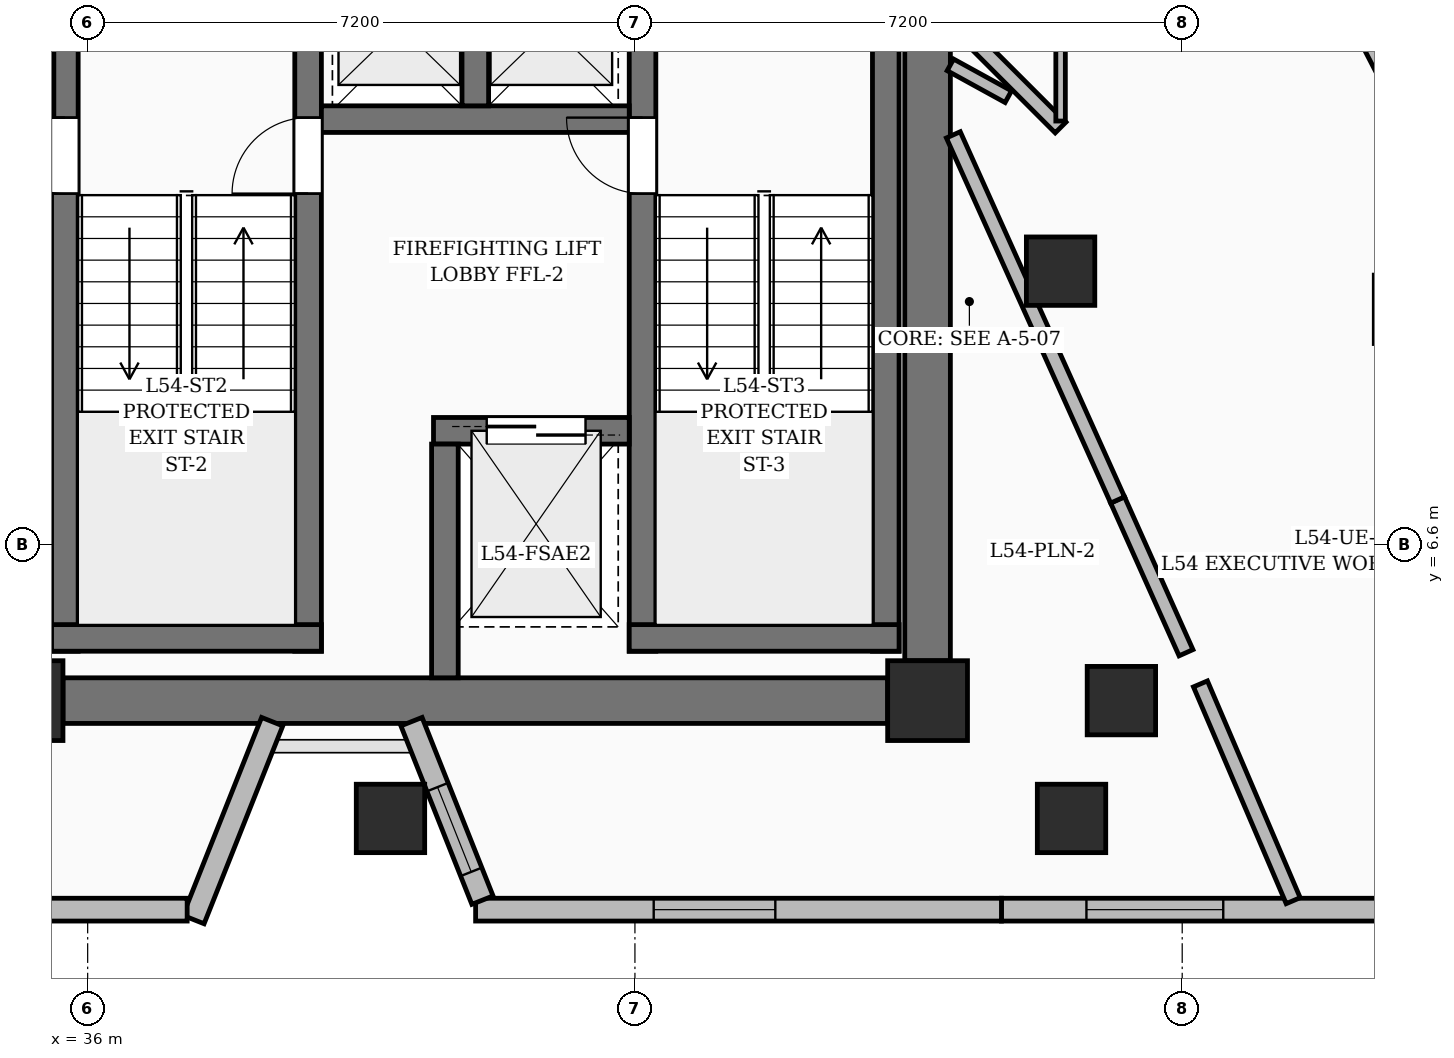
"""IFC4 building model, lengths in metres.
Left out: names, types, materials, properties, quantities, classifications, styles, units other than length and angle.
Written with IfcOpenShell. Run it as: python <this file> out.ifc"""

import sys

from ifc_helpers import new_model, si_unit, direction, frame, frame_2d, origin, origin_2d, place, context, subcontext, project, spatial, rectangle, extrude, element, fill, save


model = new_model("IFC4")
c1 = context("Model", 3, precision=1e-05, world=origin(), true_north=direction((0.0, 1.0)))
c2 = subcontext(c1, "Body", "Model", "MODEL_VIEW")
j1 = project(units=[si_unit("LENGTHUNIT", "METRE"), si_unit("PLANEANGLEUNIT", "RADIAN")], contexts=[c1])
p1 = place(None, origin())
s1 = spatial("IfcSite", under=j1, at=p1, CompositionType="ELEMENT")
p2 = place(p1, origin())
s2 = spatial("IfcBuilding", under=s1, at=p2, CompositionType="ELEMENT")
p3 = place(p2, frame((0.0, 0.0, 210.75)))
s3 = spatial("IfcBuildingStorey", under=s2, at=p3, CompositionType="ELEMENT", Elevation=210.75)
for number, where, z_axis, x_axis in (
    (1, (35.15, 4.55, 0.0), (0.0, 0.0, 1.0), (1.0, 0.0, 0.0)),
    (2, (47.05, 4.55, 0.0), (0.0, 0.0, 1.0), (1.0, 0.0, 0.0)),
):
    element("IfcColumn", number, at=place(p3, frame(where, z_axis=z_axis, x_axis=x_axis)), inside=s3, PredefinedType="COLUMN", context=c2, shape_type="SweptSolid", body=[
        extrude(rectangle(XDim=1.05, YDim=1.05, at=origin_2d()), origin(), (0.0, 0.0, 1.0), 3.75),
    ])
for number, where, z_axis, x_axis in (
    (3, (49.6, 4.55, 0.0), (0.0, 0.0, 1.0), (1.0, 0.0, 0.0)),
    (4, (48.8, 10.2, 0.0), (0.0, 0.0, 1.0), (1.0, 0.0, 0.0)),
):
    element("IfcColumn", number, at=place(p3, frame(where, z_axis=z_axis, x_axis=x_axis)), inside=s3, PredefinedType="COLUMN", context=c2, shape_type="SweptSolid", body=[
        extrude(rectangle(XDim=0.9, YDim=0.9, at=origin_2d()), origin(), (0.0, 0.0, 1.0), 3.75),
    ])
p4 = place(p3, frame((35.675, 4.55, 0.0), z_axis=(0.0, 0.0, 1.0), x_axis=(1.0, 0.0, 0.0)))
e5 = element("IfcWall", 5, at=p4, inside=s3, PredefinedType="SHEAR", context=c2, shape_type="SweptSolid", body=[
    extrude(rectangle(XDim=10.85, YDim=0.6, at=frame_2d((5.425, 0.0))), origin(), (0.0, 0.0, 1.0), 3.75),
])
p5 = place(p3, frame((47.05, 5.075, 0.0), z_axis=(0.0, 0.0, 1.0), x_axis=(0.0, 1.0, 0.0)))
e6 = element("IfcWall", 6, at=p5, inside=s3, PredefinedType="SHEAR", context=c2, shape_type="SweptSolid", body=[
    extrude(rectangle(XDim=9.15, YDim=0.6, at=frame_2d((4.575, 0.0))), origin(), (0.0, 0.0, 1.0), 3.75),
])
p6 = place(p3, frame((35.7, 5.2, 0.0), z_axis=(0.0, 0.0, 1.0), x_axis=(0.0, 1.0, 0.0)))
e7 = element("IfcWall", 7, at=p6, inside=s3, PredefinedType="SOLIDWALL", context=c2, shape_type="SweptSolid", body=[
    extrude(rectangle(XDim=9.25, YDim=0.35, at=frame_2d((4.625, 0.0))), origin(), (0.0, 0.0, 1.0), 3.75),
])
p7 = place(p6, frame((6.02, 0.0, 0.0)))
e8 = element("IfcOpeningElement", 8, at=p7, cuts=e7, PredefinedType="OPENING", context=c2, shape_type="SweptSolid", body=[
    extrude(rectangle(XDim=1.0, YDim=2.15, at=frame_2d((0.5, 1.075))), frame((0.0, 0.185, 0.0), z_axis=(0.0, -1.0, 0.0), x_axis=(1.0, 0.0, 0.0)), (0.0, 0.0, 1.0), 0.37),
])
p8 = place(p3, frame((38.9, 5.2, 0.0), z_axis=(0.0, 0.0, 1.0), x_axis=(0.0, 1.0, 0.0)))
e9 = element("IfcWall", 9, at=p8, inside=s3, PredefinedType="SOLIDWALL", context=c2, shape_type="SweptSolid", body=[
    extrude(rectangle(XDim=9.25, YDim=0.35, at=frame_2d((4.625, 0.0))), origin(), (0.0, 0.0, 1.0), 3.75),
])
p9 = place(p8, frame((6.02, 0.0, 0.0)))
e10 = element("IfcOpeningElement", 10, at=p9, cuts=e9, PredefinedType="OPENING", context=c2, shape_type="SweptSolid", body=[
    extrude(rectangle(XDim=1.0, YDim=2.15, at=frame_2d((0.5, 1.075))), frame((0.0, 0.185, 0.0), z_axis=(0.0, -1.0, 0.0), x_axis=(1.0, 0.0, 0.0)), (0.0, 0.0, 1.0), 0.37),
])
p10 = place(p3, frame((35.525, 5.375, 0.0), z_axis=(0.0, 0.0, 1.0), x_axis=(1.0, 0.0, 0.0)))
e11 = element("IfcWall", 11, at=p10, inside=s3, PredefinedType="SOLIDWALL", context=c2, shape_type="SweptSolid", body=[
    extrude(rectangle(XDim=3.55, YDim=0.35, at=frame_2d((1.775, 0.0))), origin(), (0.0, 0.0, 1.0), 3.75),
])
p11 = place(p3, frame((43.3, 5.2, 0.0), z_axis=(0.0, 0.0, 1.0), x_axis=(0.0, 1.0, 0.0)))
e12 = element("IfcWall", 12, at=p11, inside=s3, PredefinedType="SOLIDWALL", context=c2, shape_type="SweptSolid", body=[
    extrude(rectangle(XDim=9.25, YDim=0.35, at=frame_2d((4.625, 0.0))), origin(), (0.0, 0.0, 1.0), 3.75),
])
p12 = place(p11, frame((6.02, 0.0, 0.0)))
e13 = element("IfcOpeningElement", 13, at=p12, cuts=e12, PredefinedType="OPENING", context=c2, shape_type="SweptSolid", body=[
    extrude(rectangle(XDim=1.0, YDim=2.15, at=frame_2d((0.5, 1.075))), frame((0.0, 0.185, 0.0), z_axis=(0.0, -1.0, 0.0), x_axis=(1.0, 0.0, 0.0)), (0.0, 0.0, 1.0), 0.37),
])
p13 = place(p3, frame((46.5, 5.2, 0.0), z_axis=(0.0, 0.0, 1.0), x_axis=(0.0, 1.0, 0.0)))
e14 = element("IfcWall", 14, at=p13, inside=s3, PredefinedType="SOLIDWALL", context=c2, shape_type="SweptSolid", body=[
    extrude(rectangle(XDim=9.25, YDim=0.35, at=frame_2d((4.625, 0.0))), origin(), (0.0, 0.0, 1.0), 3.75),
])
p14 = place(p3, frame((43.125, 5.375, 0.0), z_axis=(0.0, 0.0, 1.0), x_axis=(1.0, 0.0, 0.0)))
e15 = element("IfcWall", 15, at=p14, inside=s3, PredefinedType="SOLIDWALL", context=c2, shape_type="SweptSolid", body=[
    extrude(rectangle(XDim=3.55, YDim=0.35, at=frame_2d((1.775, 0.0))), origin(), (0.0, 0.0, 1.0), 3.75),
])
p15 = place(p3, frame((40.55, 8.1, 0.0), z_axis=(0.0, 0.0, 1.0), x_axis=(1.0, 0.0, 0.0)))
e16 = element("IfcWall", 16, at=p15, inside=s3, PredefinedType="SOLIDWALL", context=c2, shape_type="SweptSolid", body=[
    extrude(rectangle(XDim=2.575, YDim=0.35, at=frame_2d((1.288, 0.0))), origin(), (0.0, 0.0, 1.0), 3.75),
])
p16 = place(p15, frame((0.7, 0.0, 0.0)))
e17 = element("IfcOpeningElement", 17, at=p16, cuts=e16, PredefinedType="OPENING", context=c2, shape_type="SweptSolid", body=[
    extrude(rectangle(XDim=1.3, YDim=2.25, at=frame_2d((0.65, 1.125))), frame((0.0, 0.185, 0.0), z_axis=(0.0, -1.0, 0.0), x_axis=(1.0, 0.0, 0.0)), (0.0, 0.0, 1.0), 0.37),
])
p17 = place(p3, frame((40.7, 4.85, 0.0), z_axis=(0.0, 0.0, 1.0), x_axis=(0.0, 1.0, 0.0)))
e18 = element("IfcWall", 18, at=p17, inside=s3, PredefinedType="SOLIDWALL", context=c2, shape_type="SweptSolid", body=[
    extrude(rectangle(XDim=3.075, YDim=0.35, at=frame_2d((1.538, 0.0))), origin(), (0.0, 0.0, 1.0), 3.75),
])
p18 = place(p3, frame((39.075, 12.2, 0.0), z_axis=(0.0, 0.0, 1.0), x_axis=(1.0, 0.0, 0.0)))
e19 = element("IfcWall", 19, at=p18, inside=s3, PredefinedType="SOLIDWALL", context=c2, shape_type="SweptSolid", body=[
    extrude(rectangle(XDim=4.05, YDim=0.35, at=frame_2d((2.025, 0.0))), origin(), (0.0, 0.0, 1.0), 3.75),
])
p19 = place(p3, frame((41.1, 12.375, 0.0), z_axis=(0.0, 0.0, 1.0), x_axis=(0.0, 1.0, 0.0)))
e20 = element("IfcWall", 20, at=p19, inside=s3, PredefinedType="SOLIDWALL", context=c2, shape_type="SweptSolid", body=[
    extrude(rectangle(XDim=2.075, YDim=0.35, at=frame_2d((1.038, 0.0))), origin(), (0.0, 0.0, 1.0), 3.75),
])
for number, where, z_axis, x_axis in (
    (21, (39.984, 3.0, 0.0), (0.0, 0.0, 1.0), (1.0, 0.0, 0.0)),
    (22, (48.944, 3.0, 0.0), (0.0, 0.0, 1.0), (1.0, 0.0, 0.0)),
    (23, (53.377, 9.698, 0.0), (0.0, 0.0, 1.0), (1.0, 0.0, 0.0)),
):
    element("IfcColumn", number, at=place(p3, frame(where, z_axis=z_axis, x_axis=x_axis)), inside=s3, PredefinedType="COLUMN", context=c2, shape_type="SweptSolid", body=[
        extrude(rectangle(XDim=0.9, YDim=0.9, at=origin_2d()), origin(), (0.0, 0.0, 1.0), 3.75),
    ])
p20 = place(p3, frame((51.288, 16.369, 0.0), z_axis=(0.0, 0.0, 1.0), x_axis=(0.458306446078, -0.88879424024, 0.0)))
e24 = element("IfcWall", 24, at=p20, inside=s3, PredefinedType="SOLIDWALL", context=c2, shape_type="SweptSolid", body=[
    extrude(rectangle(XDim=6.266, YDim=0.3, at=frame_2d((3.133, 0.0))), origin(), (0.0, 0.0, 1.0), 3.5),
])
p21 = place(p20, frame((2.875, 0.0, 0.6)))
e25 = element("IfcOpeningElement", 25, at=p21, cuts=e24, PredefinedType="OPENING", context=c2, shape_type="SweptSolid", body=[
    extrude(rectangle(XDim=1.8, YDim=2.1, at=frame_2d((0.9, 1.05))), frame((0.0, 0.16, 0.0), z_axis=(0.0, -1.0, 0.0), x_axis=(1.0, 0.0, 0.0)), (0.0, 0.0, 1.0), 0.32),
])
p22 = place(p3, frame((54.36, 1.8, 0.0), z_axis=(0.0, 0.0, 1.0), x_axis=(-1.0, 0.0, 0.0)))
e26 = element("IfcWall", 26, at=p22, inside=s3, PredefinedType="SOLIDWALL", context=c2, shape_type="SweptSolid", body=[
    extrude(rectangle(XDim=6.338, YDim=0.3, at=frame_2d((3.169, 0.0))), origin(), (0.0, 0.0, 1.0), 3.5),
])
p23 = place(p22, frame((3.42, 0.0, 0.6)))
e27 = element("IfcOpeningElement", 27, at=p23, cuts=e26, PredefinedType="OPENING", context=c2, shape_type="SweptSolid", body=[
    extrude(rectangle(XDim=1.8, YDim=2.1, at=frame_2d((0.9, 1.05))), frame((0.0, 0.16, 0.0), z_axis=(0.0, -1.0, 0.0), x_axis=(1.0, 0.0, 0.0)), (0.0, 0.0, 1.0), 0.32),
])
p24 = place(p3, frame((48.022, 1.8, 0.0), z_axis=(0.0, 0.0, 1.0), x_axis=(-1.0, 0.0, 0.0)))
e28 = element("IfcWall", 28, at=p24, inside=s3, PredefinedType="SOLIDWALL", context=c2, shape_type="SweptSolid", body=[
    extrude(rectangle(XDim=6.918, YDim=0.3, at=frame_2d((3.459, 0.0))), origin(), (0.0, 0.0, 1.0), 3.5),
])
p25 = place(p24, frame((2.975, 0.0, 0.55)))
e29 = element("IfcOpeningElement", 29, at=p25, cuts=e28, PredefinedType="OPENING", context=c2, shape_type="SweptSolid", body=[
    extrude(rectangle(XDim=1.6, YDim=2.2, at=frame_2d((0.8, 1.1))), frame((0.0, 0.16, 0.0), z_axis=(0.0, -1.0, 0.0), x_axis=(1.0, 0.0, 0.0)), (0.0, 0.0, 1.0), 0.32),
])
p26 = place(p3, frame((41.194, 1.925, 0.0), z_axis=(0.0, 0.0, 1.0), x_axis=(-0.369457562636, 0.929247603931, 0.0)))
e30 = element("IfcWall", 30, at=p26, inside=s3, PredefinedType="SOLIDWALL", context=c2, shape_type="SweptSolid", body=[
    extrude(rectangle(XDim=2.527, YDim=0.3, at=frame_2d((1.263, 0.0))), origin(), (0.0, 0.0, 1.0), 2.825),
])
p27 = place(p26, frame((0.4, 0.0, 0.8)))
e31 = element("IfcOpeningElement", 31, at=p27, cuts=e30, PredefinedType="OPENING", context=c2, shape_type="SweptSolid", body=[
    extrude(rectangle(XDim=1.2, YDim=1.8, at=frame_2d((0.6, 0.9))), frame((0.0, 0.16, 0.0), z_axis=(0.0, -1.0, 0.0), x_axis=(1.0, 0.0, 0.0)), (0.0, 0.0, 1.0), 0.32),
])
p28 = place(p3, frame((38.427, 4.273, 0.0), z_axis=(0.0, 0.0, 1.0), x_axis=(-0.369466825356, -0.929243921132, 0.0)))
e32 = element("IfcWall", 32, at=p28, inside=s3, PredefinedType="SOLIDWALL", context=c2, shape_type="SweptSolid", body=[
    extrude(rectangle(XDim=2.802, YDim=0.3, at=frame_2d((1.401, 0.0))), origin(), (0.0, 0.0, 1.0), 2.69),
])
p29 = place(p3, frame((37.309, 1.8, 0.0), z_axis=(0.0, 0.0, 1.0), x_axis=(-1.0, 0.0, 0.0)))
e33 = element("IfcWall", 33, at=p29, inside=s3, PredefinedType="SOLIDWALL", context=c2, shape_type="SweptSolid", body=[
    extrude(rectangle(XDim=6.3, YDim=0.3, at=frame_2d((3.15, 0.0))), origin(), (0.0, 0.0, 1.0), 3.5),
])
p30 = place(p29, frame((4.4, 0.0, 0.8)))
e34 = element("IfcOpeningElement", 34, at=p30, cuts=e33, PredefinedType="OPENING", context=c2, shape_type="SweptSolid", body=[
    extrude(rectangle(XDim=1.2, YDim=1.8, at=frame_2d((0.6, 0.9))), frame((0.0, 0.16, 0.0), z_axis=(0.0, -1.0, 0.0), x_axis=(1.0, 0.0, 0.0)), (0.0, 0.0, 1.0), 0.32),
])
p31 = place(p3, frame((35.48, 12.22, 0.0), z_axis=(0.0, 0.0, 1.0), x_axis=(0.0, 1.0, 0.0)))
e35 = element("IfcWall", 35, at=p31, inside=s3, PredefinedType="PARTITIONING", context=c2, shape_type="SweptSolid", body=[
    extrude(rectangle(XDim=2.396, YDim=0.15, at=frame_2d((1.198, 0.0))), origin(), (0.0, 0.0, 1.0), 3.5),
])
p32 = place(p3, frame((50.45, 5.18, 0.0), z_axis=(0.0, 0.0, 1.0), x_axis=(-0.408626143047, 0.912701854506, 0.0)))
e36 = element("IfcWall", 36, at=p32, inside=s3, PredefinedType="PARTITIONING", context=c2, shape_type="SweptSolid", body=[
    extrude(rectangle(XDim=2.202, YDim=0.2, at=frame_2d((1.101, 0.0))), origin(), (0.0, 0.0, 1.0), 2.82),
])
p33 = place(p3, frame((51.86, 1.918, 0.0), z_axis=(0.0, 0.0, 1.0), x_axis=(-0.393349316575, 0.919389098886, 0.0)))
e37 = element("IfcWall", 37, at=p33, inside=s3, PredefinedType="PARTITIONING", context=c2, shape_type="SweptSolid", body=[
    extrude(rectangle(XDim=3.102, YDim=0.2, at=frame_2d((1.551, 0.0))), origin(), (0.0, 0.0, 1.0), 3.5),
])
p34 = place(p3, frame((49.55, 7.19, 0.0), z_axis=(0.0, 0.0, 1.0), x_axis=(-0.410297221829, 0.91195185715, 0.0)))
e38 = element("IfcWall", 38, at=p34, inside=s3, PredefinedType="PARTITIONING", context=c2, shape_type="SweptSolid", body=[
    extrude(rectangle(XDim=5.267, YDim=0.2, at=frame_2d((2.634, 0.0))), origin(), (0.0, 0.0, 1.0), 2.685),
])
p35 = place(p3, frame((48.8, 12.09, 0.0), z_axis=(0.0, 0.0, 1.0), x_axis=(-0.707106781187, 0.707106781187, 0.0)))
e39 = element("IfcWall", 39, at=p35, inside=s3, PredefinedType="PARTITIONING", context=c2, shape_type="SweptSolid", body=[
    extrude(rectangle(XDim=2.051, YDim=0.2, at=frame_2d((1.025, 0.0))), origin(), (0.0, 0.0, 1.0), 3.5),
])
p36 = place(p3, frame((48.8, 12.175, 0.0), z_axis=(0.0, 0.0, 1.0), x_axis=(0.0, 1.0, 0.0)))
e40 = element("IfcWall", 40, at=p36, inside=s3, PredefinedType="PARTITIONING", context=c2, shape_type="SweptSolid", body=[
    extrude(rectangle(XDim=2.415, YDim=0.125, at=frame_2d((1.208, 0.0))), origin(), (0.0, 0.0, 1.0), 3.16),
])
p37 = place(p36, frame((0.979, 0.0, 0.0)))
e41 = element("IfcOpeningElement", 41, at=p37, cuts=e40, PredefinedType="OPENING", context=c2, shape_type="SweptSolid", body=[
    extrude(rectangle(XDim=0.95, YDim=2.2, at=frame_2d((0.475, 1.1))), frame((0.0, 0.072, 0.0), z_axis=(0.0, -1.0, 0.0), x_axis=(1.0, 0.0, 0.0)), (0.0, 0.0, 1.0), 0.145),
])
p38 = place(p3, frame((47.35, 12.914, 0.0), z_axis=(0.0, 0.0, 1.0), x_axis=(0.876281108122, -0.481800186331, 0.0)))
e42 = element("IfcWall", 42, at=p38, inside=s3, PredefinedType="PARTITIONING", context=c2, shape_type="SweptSolid", body=[
    extrude(rectangle(XDim=0.87, YDim=0.175, at=frame_2d((0.435, 0.0))), origin(), (0.0, 0.0, 1.0), 3.5),
])
p39 = place(p21, origin())
e43 = element("IfcWindow", 43, at=p39, inside=s3, PartitioningType="SINGLE_PANEL", PredefinedType="WINDOW", context=c2, shape_type="SweptSolid", body=[
    extrude(rectangle(XDim=1.8, YDim=2.1, at=frame_2d((0.9, 1.05))), frame((0.0, 0.03, 0.0), z_axis=(0.0, -1.0, 0.0), x_axis=(1.0, 0.0, 0.0)), (0.0, 0.0, 1.0), 0.06),
])
fill(e25, e43)
p40 = place(p23, origin())
e44 = element("IfcWindow", 44, at=p40, inside=s3, PartitioningType="SINGLE_PANEL", PredefinedType="WINDOW", context=c2, shape_type="SweptSolid", body=[
    extrude(rectangle(XDim=1.8, YDim=2.1, at=frame_2d((0.9, 1.05))), frame((0.0, 0.03, 0.0), z_axis=(0.0, -1.0, 0.0), x_axis=(1.0, 0.0, 0.0)), (0.0, 0.0, 1.0), 0.06),
])
fill(e27, e44)
p41 = place(p25, origin())
e45 = element("IfcWindow", 45, at=p41, inside=s3, PartitioningType="SINGLE_PANEL", PredefinedType="WINDOW", context=c2, shape_type="SweptSolid", body=[
    extrude(rectangle(XDim=1.6, YDim=2.2, at=frame_2d((0.8, 1.1))), frame((0.0, 0.03, 0.0), z_axis=(0.0, -1.0, 0.0), x_axis=(1.0, 0.0, 0.0)), (0.0, 0.0, 1.0), 0.06),
])
fill(e29, e45)
p42 = place(p27, origin())
e46 = element("IfcWindow", 46, at=p42, inside=s3, PartitioningType="SINGLE_PANEL", PredefinedType="WINDOW", context=c2, shape_type="SweptSolid", body=[
    extrude(rectangle(XDim=1.2, YDim=1.8, at=frame_2d((0.6, 0.9))), frame((0.0, 0.03, 0.0), z_axis=(0.0, -1.0, 0.0), x_axis=(1.0, 0.0, 0.0)), (0.0, 0.0, 1.0), 0.06),
])
fill(e31, e46)
p43 = place(p7, origin())
e47 = element("IfcDoor", 47, at=p43, inside=s3, OperationType="SINGLE_SWING_RIGHT", PredefinedType="DOOR", context=c2, shape_type="SweptSolid", body=[
    extrude(rectangle(XDim=1.0, YDim=2.15, at=frame_2d((0.5, 1.075))), frame((0.0, 0.025, 0.0), z_axis=(0.0, -1.0, 0.0), x_axis=(1.0, 0.0, 0.0)), (0.0, 0.0, 1.0), 0.05),
])
fill(e8, e47)
p44 = place(p9, origin())
e48 = element("IfcDoor", 48, at=p44, inside=s3, OperationType="SINGLE_SWING_LEFT", PredefinedType="DOOR", context=c2, shape_type="SweptSolid", body=[
    extrude(rectangle(XDim=1.0, YDim=2.15, at=frame_2d((0.5, 1.075))), frame((0.0, 0.025, 0.0), z_axis=(0.0, -1.0, 0.0), x_axis=(1.0, 0.0, 0.0)), (0.0, 0.0, 1.0), 0.05),
])
fill(e10, e48)
p45 = place(p12, origin())
e49 = element("IfcDoor", 49, at=p45, inside=s3, OperationType="SINGLE_SWING_RIGHT", PredefinedType="DOOR", context=c2, shape_type="SweptSolid", body=[
    extrude(rectangle(XDim=1.0, YDim=2.15, at=frame_2d((0.5, 1.075))), frame((0.0, 0.025, 0.0), z_axis=(0.0, -1.0, 0.0), x_axis=(1.0, 0.0, 0.0)), (0.0, 0.0, 1.0), 0.05),
])
fill(e13, e49)
p46 = place(p16, origin())
e50 = element("IfcDoor", 50, at=p46, inside=s3, OperationType="DOUBLE_DOOR_SLIDING", PredefinedType="DOOR", context=c2, shape_type="SweptSolid", body=[
    extrude(rectangle(XDim=1.3, YDim=2.25, at=frame_2d((0.65, 1.125))), frame((0.0, 0.025, 0.0), z_axis=(0.0, -1.0, 0.0), x_axis=(1.0, 0.0, 0.0)), (0.0, 0.0, 1.0), 0.05),
])
fill(e17, e50)
save(model, sys.argv[1])
